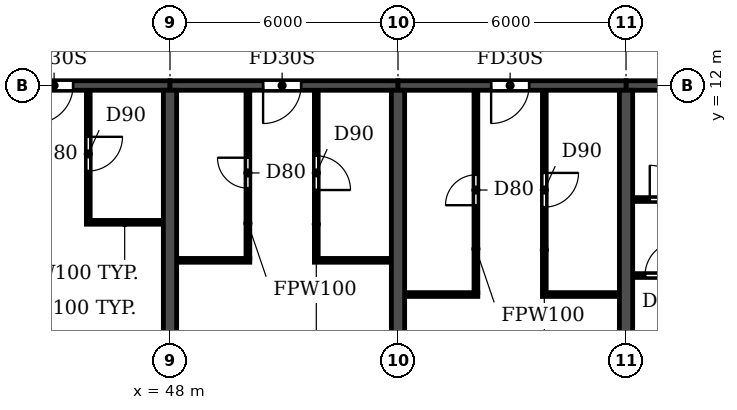
"""IFC4 building model, lengths in metres.
Left out: names, types, materials, properties, quantities, classifications, styles, units other than length and angle.
Written with IfcOpenShell. Run it as: python <this file> out.ifc"""

import sys

from ifc_helpers import new_model, si_unit, direction, frame, frame_2d, origin, place, context, subcontext, project, spatial, rectangle, extrude, element, fill, save


model = new_model("IFC4")
c1 = context("Model", 3, precision=1e-05, world=origin(), true_north=direction((0.0, 1.0)))
c2 = subcontext(c1, "Body", "Model", "MODEL_VIEW")
j1 = project(units=[si_unit("LENGTHUNIT", "METRE"), si_unit("PLANEANGLEUNIT", "RADIAN")], contexts=[c1])
p1 = place(None, origin())
s1 = spatial("IfcSite", under=j1, at=p1, CompositionType="ELEMENT")
p2 = place(p1, origin())
s2 = spatial("IfcBuilding", under=s1, at=p2, CompositionType="ELEMENT")
p3 = place(p2, frame((0.0, 0.0, 82.8)))
s3 = spatial("IfcBuildingStorey", under=s2, at=p3, CompositionType="ELEMENT", Elevation=82.8)
for number, where, z_axis, x_axis in (
    (1, (48.0, 0.2, 0.0), (0.0, 0.0, 1.0), (0.0, 1.0, 0.0)),
    (2, (54.0, 0.2, 0.0), (0.0, 0.0, 1.0), (0.0, 1.0, 0.0)),
    (3, (60.0, 0.2, 0.0), (0.0, 0.0, 1.0), (0.0, 1.0, 0.0)),
):
    element("IfcWall", number, at=place(p3, frame(where, z_axis=z_axis, x_axis=x_axis)), inside=s3, PredefinedType="SHEAR", context=c2, shape_type="SweptSolid", body=[
        extrude(rectangle(XDim=11.675, YDim=0.35, at=frame_2d((5.837, 0.0))), origin(), (0.0, 0.0, 1.0), 3.06),
    ])
p4 = place(p3, frame((42.0, 12.0, 0.0), z_axis=(0.0, 0.0, 1.0), x_axis=(1.0, 0.0, 0.0)))
e4 = element("IfcWall", 4, at=p4, inside=s3, PredefinedType="SHEAR", context=c2, shape_type="SweptSolid", body=[
    extrude(rectangle(XDim=6.0, YDim=0.25, at=frame_2d((3.0, 0.0))), origin(), (0.0, 0.0, 1.0), 2.46),
])
p5 = place(p4, frame((2.45, 0.0, 0.0)))
e5 = element("IfcOpeningElement", 5, at=p5, cuts=e4, PredefinedType="OPENING", context=c2, shape_type="SweptSolid", body=[
    extrude(rectangle(XDim=1.0, YDim=2.1, at=frame_2d((0.5, 1.05))), frame((0.0, 0.135, 0.0), z_axis=(0.0, -1.0, 0.0), x_axis=(1.0, 0.0, 0.0)), (0.0, 0.0, 1.0), 0.27),
])
p6 = place(p3, frame((48.0, 12.0, 0.0), z_axis=(0.0, 0.0, 1.0), x_axis=(1.0, 0.0, 0.0)))
e6 = element("IfcWall", 6, at=p6, inside=s3, PredefinedType="SHEAR", context=c2, shape_type="SweptSolid", body=[
    extrude(rectangle(XDim=6.0, YDim=0.25, at=frame_2d((3.0, 0.0))), origin(), (0.0, 0.0, 1.0), 2.46),
])
p7 = place(p6, frame((2.45, 0.0, 0.0)))
e7 = element("IfcOpeningElement", 7, at=p7, cuts=e6, PredefinedType="OPENING", context=c2, shape_type="SweptSolid", body=[
    extrude(rectangle(XDim=1.0, YDim=2.1, at=frame_2d((0.5, 1.05))), frame((0.0, 0.135, 0.0), z_axis=(0.0, -1.0, 0.0), x_axis=(1.0, 0.0, 0.0)), (0.0, 0.0, 1.0), 0.27),
])
p8 = place(p3, frame((54.0, 12.0, 0.0), z_axis=(0.0, 0.0, 1.0), x_axis=(1.0, 0.0, 0.0)))
e8 = element("IfcWall", 8, at=p8, inside=s3, PredefinedType="SHEAR", context=c2, shape_type="SweptSolid", body=[
    extrude(rectangle(XDim=6.0, YDim=0.25, at=frame_2d((3.0, 0.0))), origin(), (0.0, 0.0, 1.0), 2.46),
])
p9 = place(p8, frame((2.45, 0.0, 0.0)))
e9 = element("IfcOpeningElement", 9, at=p9, cuts=e8, PredefinedType="OPENING", context=c2, shape_type="SweptSolid", body=[
    extrude(rectangle(XDim=1.0, YDim=2.1, at=frame_2d((0.5, 1.05))), frame((0.0, 0.135, 0.0), z_axis=(0.0, -1.0, 0.0), x_axis=(1.0, 0.0, 0.0)), (0.0, 0.0, 1.0), 0.27),
])
p10 = place(p3, frame((60.0, 12.0, 0.0), z_axis=(0.0, 0.0, 1.0), x_axis=(1.0, 0.0, 0.0)))
e10 = element("IfcWall", 10, at=p10, inside=s3, PredefinedType="SHEAR", context=c2, shape_type="SweptSolid", body=[
    extrude(rectangle(XDim=6.0, YDim=0.25, at=frame_2d((3.0, 0.0))), origin(), (0.0, 0.0, 1.0), 2.46),
])
p11 = place(p10, frame((2.55, 0.0, 0.0)))
e11 = element("IfcOpeningElement", 11, at=p11, cuts=e10, PredefinedType="OPENING", context=c2, shape_type="SweptSolid", body=[
    extrude(rectangle(XDim=1.0, YDim=2.1, at=frame_2d((0.5, 1.05))), frame((0.0, 0.135, 0.0), z_axis=(0.0, -1.0, 0.0), x_axis=(1.0, 0.0, 0.0)), (0.0, 0.0, 1.0), 0.27),
])
p12 = place(p3, frame((54.185, 6.5, 0.0), z_axis=(0.0, 0.0, 1.0), x_axis=(1.0, 0.0, 0.0)))
e12 = element("IfcWall", 12, at=p12, inside=s3, PredefinedType="PARTITIONING", context=c2, shape_type="SweptSolid", body=[
    extrude(rectangle(XDim=1.915, YDim=0.1, at=frame_2d((0.958, 0.0))), origin(), (0.0, 0.0, 1.0), 3.06),
])
p13 = place(p3, frame((57.8, 6.5, 0.0), z_axis=(0.0, 0.0, 1.0), x_axis=(1.0, 0.0, 0.0)))
e13 = element("IfcWall", 13, at=p13, inside=s3, PredefinedType="PARTITIONING", context=c2, shape_type="SweptSolid", body=[
    extrude(rectangle(XDim=2.015, YDim=0.1, at=frame_2d((1.007, 0.0))), origin(), (0.0, 0.0, 1.0), 3.06),
])
p14 = place(p3, frame((60.185, 7.0, 0.0), z_axis=(0.0, 0.0, 1.0), x_axis=(1.0, 0.0, 0.0)))
e14 = element("IfcWall", 14, at=p14, inside=s3, PredefinedType="PARTITIONING", context=c2, shape_type="SweptSolid", body=[
    extrude(rectangle(XDim=2.865, YDim=0.1, at=frame_2d((1.433, 0.0))), origin(), (0.0, 0.0, 1.0), 3.06),
])
p15 = place(p14, frame((0.315, 0.0, 0.0)))
e15 = element("IfcOpeningElement", 15, at=p15, cuts=e14, PredefinedType="OPENING", context=c2, shape_type="SweptSolid", body=[
    extrude(rectangle(XDim=0.9, YDim=2.1, at=frame_2d((0.45, 1.05))), frame((0.0, 0.06, 0.0), z_axis=(0.0, -1.0, 0.0), x_axis=(1.0, 0.0, 0.0)), (0.0, 0.0, 1.0), 0.12),
])
p16 = place(p3, frame((48.185, 7.4, 0.0), z_axis=(0.0, 0.0, 1.0), x_axis=(1.0, 0.0, 0.0)))
e16 = element("IfcWall", 16, at=p16, inside=s3, PredefinedType="PARTITIONING", context=c2, shape_type="SweptSolid", body=[
    extrude(rectangle(XDim=1.915, YDim=0.1, at=frame_2d((0.958, 0.0))), origin(), (0.0, 0.0, 1.0), 3.06),
])
for number, where, z_axis, x_axis in (
    (17, (51.8, 7.4, 0.0), (0.0, 0.0, 1.0), (1.0, 0.0, 0.0)),
    (18, (45.8, 8.4, 0.0), (0.0, 0.0, 1.0), (1.0, 0.0, 0.0)),
):
    element("IfcWall", number, at=place(p3, frame(where, z_axis=z_axis, x_axis=x_axis)), inside=s3, PredefinedType="PARTITIONING", context=c2, shape_type="SweptSolid", body=[
        extrude(rectangle(XDim=2.015, YDim=0.1, at=frame_2d((1.007, 0.0))), origin(), (0.0, 0.0, 1.0), 3.06),
    ])
p17 = place(p3, frame((60.185, 9.0, 0.0), z_axis=(0.0, 0.0, 1.0), x_axis=(1.0, 0.0, 0.0)))
e19 = element("IfcWall", 19, at=p17, inside=s3, PredefinedType="PARTITIONING", context=c2, shape_type="SweptSolid", body=[
    extrude(rectangle(XDim=2.015, YDim=0.1, at=frame_2d((1.007, 0.0))), origin(), (0.0, 0.0, 1.0), 3.06),
])
p18 = place(p17, frame((0.44, 0.0, 0.0)))
e20 = element("IfcOpeningElement", 20, at=p18, cuts=e19, PredefinedType="OPENING", context=c2, shape_type="SweptSolid", body=[
    extrude(rectangle(XDim=0.9, YDim=2.1, at=frame_2d((0.45, 1.05))), frame((0.0, 0.06, 0.0), z_axis=(0.0, -1.0, 0.0), x_axis=(1.0, 0.0, 0.0)), (0.0, 0.0, 1.0), 0.12),
])
p19 = place(p3, frame((45.85, 8.45, 0.0), z_axis=(0.0, 0.0, 1.0), x_axis=(0.0, 1.0, 0.0)))
e21 = element("IfcWall", 21, at=p19, inside=s3, PredefinedType="PARTITIONING", context=c2, shape_type="SweptSolid", body=[
    extrude(rectangle(XDim=3.415, YDim=0.1, at=frame_2d((1.708, 0.0))), origin(), (0.0, 0.0, 1.0), 3.06),
])
p20 = place(p19, frame((1.3, 0.0, 0.0)))
e22 = element("IfcOpeningElement", 22, at=p20, cuts=e21, PredefinedType="OPENING", context=c2, shape_type="SweptSolid", body=[
    extrude(rectangle(XDim=0.9, YDim=2.1, at=frame_2d((0.45, 1.05))), frame((0.0, 0.06, 0.0), z_axis=(0.0, -1.0, 0.0), x_axis=(1.0, 0.0, 0.0)), (0.0, 0.0, 1.0), 0.12),
])
p21 = place(p3, frame((50.05, 7.45, 0.0), z_axis=(0.0, 0.0, 1.0), x_axis=(0.0, 1.0, 0.0)))
e23 = element("IfcWall", 23, at=p21, inside=s3, PredefinedType="PARTITIONING", context=c2, shape_type="SweptSolid", body=[
    extrude(rectangle(XDim=4.415, YDim=0.1, at=frame_2d((2.208, 0.0))), origin(), (0.0, 0.0, 1.0), 3.06),
])
p22 = place(p21, frame((1.85, 0.0, 0.0)))
e24 = element("IfcOpeningElement", 24, at=p22, cuts=e23, PredefinedType="OPENING", context=c2, shape_type="SweptSolid", body=[
    extrude(rectangle(XDim=0.8, YDim=2.1, at=frame_2d((0.4, 1.05))), frame((0.0, 0.06, 0.0), z_axis=(0.0, -1.0, 0.0), x_axis=(1.0, 0.0, 0.0)), (0.0, 0.0, 1.0), 0.12),
])
p23 = place(p3, frame((51.85, 7.45, 0.0), z_axis=(0.0, 0.0, 1.0), x_axis=(0.0, 1.0, 0.0)))
e25 = element("IfcWall", 25, at=p23, inside=s3, PredefinedType="PARTITIONING", context=c2, shape_type="SweptSolid", body=[
    extrude(rectangle(XDim=4.415, YDim=0.1, at=frame_2d((2.208, 0.0))), origin(), (0.0, 0.0, 1.0), 3.06),
])
p24 = place(p23, frame((1.8, 0.0, 0.0)))
e26 = element("IfcOpeningElement", 26, at=p24, cuts=e25, PredefinedType="OPENING", context=c2, shape_type="SweptSolid", body=[
    extrude(rectangle(XDim=0.9, YDim=2.1, at=frame_2d((0.45, 1.05))), frame((0.0, 0.06, 0.0), z_axis=(0.0, -1.0, 0.0), x_axis=(1.0, 0.0, 0.0)), (0.0, 0.0, 1.0), 0.12),
])
p25 = place(p3, frame((56.05, 6.55, 0.0), z_axis=(0.0, 0.0, 1.0), x_axis=(0.0, 1.0, 0.0)))
e27 = element("IfcWall", 27, at=p25, inside=s3, PredefinedType="PARTITIONING", context=c2, shape_type="SweptSolid", body=[
    extrude(rectangle(XDim=5.315, YDim=0.1, at=frame_2d((2.657, 0.0))), origin(), (0.0, 0.0, 1.0), 3.06),
])
p26 = place(p25, frame((2.3, 0.0, 0.0)))
e28 = element("IfcOpeningElement", 28, at=p26, cuts=e27, PredefinedType="OPENING", context=c2, shape_type="SweptSolid", body=[
    extrude(rectangle(XDim=0.8, YDim=2.1, at=frame_2d((0.4, 1.05))), frame((0.0, 0.06, 0.0), z_axis=(0.0, -1.0, 0.0), x_axis=(1.0, 0.0, 0.0)), (0.0, 0.0, 1.0), 0.12),
])
p27 = place(p3, frame((57.85, 6.55, 0.0), z_axis=(0.0, 0.0, 1.0), x_axis=(0.0, 1.0, 0.0)))
e29 = element("IfcWall", 29, at=p27, inside=s3, PredefinedType="PARTITIONING", context=c2, shape_type="SweptSolid", body=[
    extrude(rectangle(XDim=5.315, YDim=0.1, at=frame_2d((2.657, 0.0))), origin(), (0.0, 0.0, 1.0), 3.06),
])
p28 = place(p27, frame((2.25, 0.0, 0.0)))
e30 = element("IfcOpeningElement", 30, at=p28, cuts=e29, PredefinedType="OPENING", context=c2, shape_type="SweptSolid", body=[
    extrude(rectangle(XDim=0.9, YDim=2.1, at=frame_2d((0.45, 1.05))), frame((0.0, 0.06, 0.0), z_axis=(0.0, -1.0, 0.0), x_axis=(1.0, 0.0, 0.0)), (0.0, 0.0, 1.0), 0.12),
])
p29 = place(p5, frame((1.0, 0.0, 0.0), z_axis=(0.0, 0.0, 1.0), x_axis=(-1.0, 0.0, 0.0)))
e31 = element("IfcDoor", 31, at=p29, inside=s3, OperationType="SINGLE_SWING_RIGHT", PredefinedType="DOOR", context=c2, shape_type="SweptSolid", body=[
    extrude(rectangle(XDim=1.0, YDim=2.1, at=frame_2d((0.5, 1.05))), frame((0.0, 0.025, 0.0), z_axis=(0.0, -1.0, 0.0), x_axis=(1.0, 0.0, 0.0)), (0.0, 0.0, 1.0), 0.05),
])
fill(e5, e31)
p30 = place(p20, frame((0.9, 0.0, 0.0), z_axis=(0.0, 0.0, 1.0), x_axis=(-1.0, 0.0, 0.0)))
e32 = element("IfcDoor", 32, at=p30, inside=s3, OperationType="SINGLE_SWING_LEFT", PredefinedType="DOOR", context=c2, shape_type="SweptSolid", body=[
    extrude(rectangle(XDim=0.9, YDim=2.1, at=frame_2d((0.45, 1.05))), frame((0.0, 0.025, 0.0), z_axis=(0.0, -1.0, 0.0), x_axis=(1.0, 0.0, 0.0)), (0.0, 0.0, 1.0), 0.05),
])
fill(e22, e32)
p31 = place(p22, origin())
e33 = element("IfcDoor", 33, at=p31, inside=s3, OperationType="SINGLE_SWING_RIGHT", PredefinedType="DOOR", context=c2, shape_type="SweptSolid", body=[
    extrude(rectangle(XDim=0.8, YDim=2.1, at=frame_2d((0.4, 1.05))), frame((0.0, 0.025, 0.0), z_axis=(0.0, -1.0, 0.0), x_axis=(1.0, 0.0, 0.0)), (0.0, 0.0, 1.0), 0.05),
])
fill(e24, e33)
p32 = place(p7, frame((1.0, 0.0, 0.0), z_axis=(0.0, 0.0, 1.0), x_axis=(-1.0, 0.0, 0.0)))
e34 = element("IfcDoor", 34, at=p32, inside=s3, OperationType="SINGLE_SWING_RIGHT", PredefinedType="DOOR", context=c2, shape_type="SweptSolid", body=[
    extrude(rectangle(XDim=1.0, YDim=2.1, at=frame_2d((0.5, 1.05))), frame((0.0, 0.025, 0.0), z_axis=(0.0, -1.0, 0.0), x_axis=(1.0, 0.0, 0.0)), (0.0, 0.0, 1.0), 0.05),
])
fill(e7, e34)
p33 = place(p24, frame((0.9, 0.0, 0.0), z_axis=(0.0, 0.0, 1.0), x_axis=(-1.0, 0.0, 0.0)))
e35 = element("IfcDoor", 35, at=p33, inside=s3, OperationType="SINGLE_SWING_RIGHT", PredefinedType="DOOR", context=c2, shape_type="SweptSolid", body=[
    extrude(rectangle(XDim=0.9, YDim=2.1, at=frame_2d((0.45, 1.05))), frame((0.0, 0.025, 0.0), z_axis=(0.0, -1.0, 0.0), x_axis=(1.0, 0.0, 0.0)), (0.0, 0.0, 1.0), 0.05),
])
fill(e26, e35)
p34 = place(p26, origin())
e36 = element("IfcDoor", 36, at=p34, inside=s3, OperationType="SINGLE_SWING_LEFT", PredefinedType="DOOR", context=c2, shape_type="SweptSolid", body=[
    extrude(rectangle(XDim=0.8, YDim=2.1, at=frame_2d((0.4, 1.05))), frame((0.0, 0.025, 0.0), z_axis=(0.0, -1.0, 0.0), x_axis=(1.0, 0.0, 0.0)), (0.0, 0.0, 1.0), 0.05),
])
fill(e28, e36)
p35 = place(p9, frame((1.0, 0.0, 0.0), z_axis=(0.0, 0.0, 1.0), x_axis=(-1.0, 0.0, 0.0)))
e37 = element("IfcDoor", 37, at=p35, inside=s3, OperationType="SINGLE_SWING_RIGHT", PredefinedType="DOOR", context=c2, shape_type="SweptSolid", body=[
    extrude(rectangle(XDim=1.0, YDim=2.1, at=frame_2d((0.5, 1.05))), frame((0.0, 0.025, 0.0), z_axis=(0.0, -1.0, 0.0), x_axis=(1.0, 0.0, 0.0)), (0.0, 0.0, 1.0), 0.05),
])
fill(e9, e37)
p36 = place(p28, frame((0.9, 0.0, 0.0), z_axis=(0.0, 0.0, 1.0), x_axis=(-1.0, 0.0, 0.0)))
e38 = element("IfcDoor", 38, at=p36, inside=s3, OperationType="SINGLE_SWING_LEFT", PredefinedType="DOOR", context=c2, shape_type="SweptSolid", body=[
    extrude(rectangle(XDim=0.9, YDim=2.1, at=frame_2d((0.45, 1.05))), frame((0.0, 0.025, 0.0), z_axis=(0.0, -1.0, 0.0), x_axis=(1.0, 0.0, 0.0)), (0.0, 0.0, 1.0), 0.05),
])
fill(e30, e38)
p37 = place(p15, origin())
e39 = element("IfcDoor", 39, at=p37, inside=s3, OperationType="SINGLE_SWING_RIGHT", PredefinedType="DOOR", context=c2, shape_type="SweptSolid", body=[
    extrude(rectangle(XDim=0.9, YDim=2.1, at=frame_2d((0.45, 1.05))), frame((0.0, 0.025, 0.0), z_axis=(0.0, -1.0, 0.0), x_axis=(1.0, 0.0, 0.0)), (0.0, 0.0, 1.0), 0.05),
])
fill(e15, e39)
p38 = place(p18, origin())
e40 = element("IfcDoor", 40, at=p38, inside=s3, OperationType="SINGLE_SWING_LEFT", PredefinedType="DOOR", context=c2, shape_type="SweptSolid", body=[
    extrude(rectangle(XDim=0.9, YDim=2.1, at=frame_2d((0.45, 1.05))), frame((0.0, 0.025, 0.0), z_axis=(0.0, -1.0, 0.0), x_axis=(1.0, 0.0, 0.0)), (0.0, 0.0, 1.0), 0.05),
])
fill(e20, e40)
save(model, sys.argv[1])
